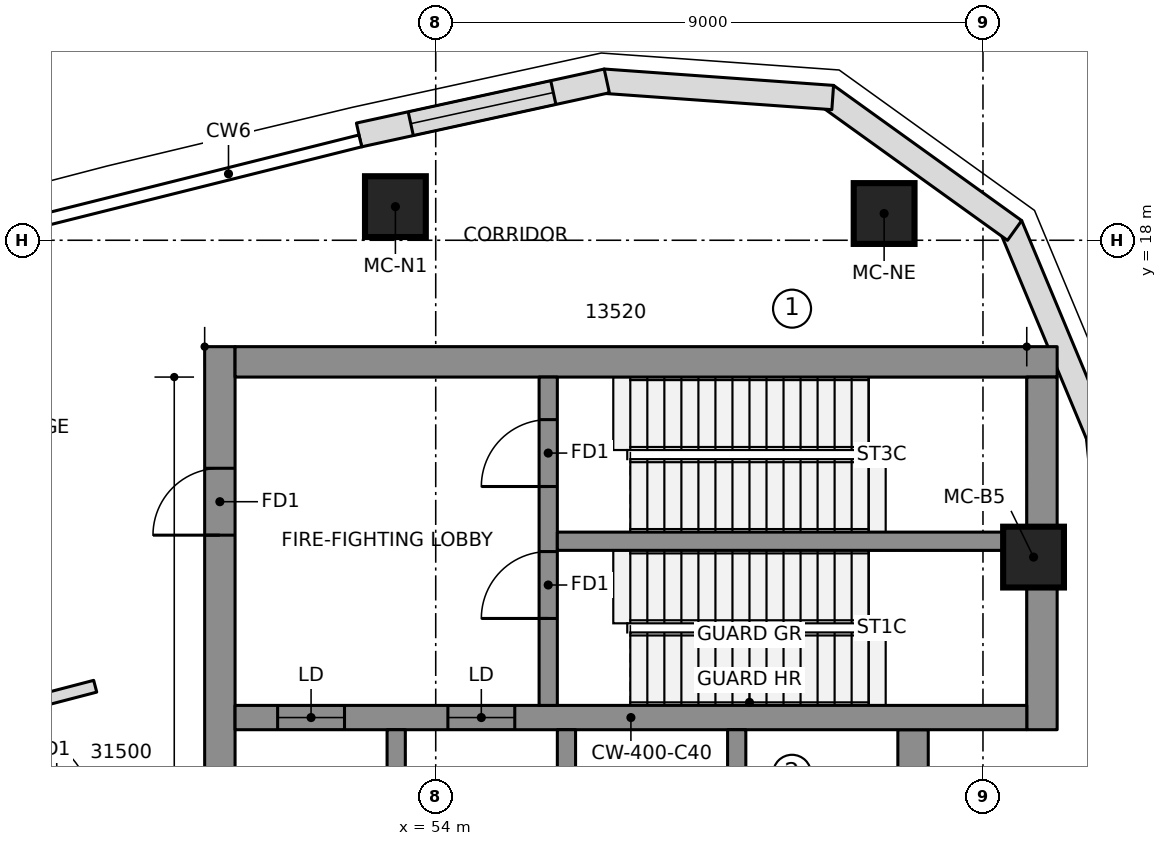
"""IFC4 building model, lengths in metres.
Left out: names, types, materials, properties, quantities, classifications, styles, units other than length and angle.
Written with IfcOpenShell. Run it as: python <this file> out.ifc"""

import sys

from ifc_helpers import new_model, si_unit, direction, frame, frame_2d, origin, origin_2d, place, context, subcontext, project, spatial, polyline, rectangle, outline, extrude, element, fill, save


model = new_model("IFC4")
c1 = context("Model", 3, precision=1e-05, world=origin(), true_north=direction((0.0, 1.0)))
c2 = subcontext(c1, "Body", "Model", "MODEL_VIEW")
j1 = project(units=[si_unit("LENGTHUNIT", "METRE"), si_unit("PLANEANGLEUNIT", "RADIAN")], contexts=[c1])
p1 = place(None, origin())
s1 = spatial("IfcSite", under=j1, at=p1, CompositionType="ELEMENT")
p2 = place(p1, origin())
s2 = spatial("IfcBuilding", under=s1, at=p2, CompositionType="ELEMENT")
p3 = place(p2, frame((0.0, 0.0, 313.2)))
s3 = spatial("IfcBuildingStorey", under=s2, at=p3, CompositionType="ELEMENT", Elevation=313.2)
p4 = place(p3, frame((50.45, 6.65, 0.0), z_axis=(0.0, 0.0, 1.0), x_axis=(0.0, 1.0, 0.0)))
e1 = element("IfcWall", 1, at=p4, inside=s3, PredefinedType="SHEAR", context=c2, shape_type="SweptSolid", body=[
    extrude(rectangle(XDim=9.6, YDim=0.5, at=frame_2d((4.8, 0.0))), origin(), (0.0, 0.0, 1.0), 5.4),
])
p5 = place(p4, frame((6.5, 0.0, 0.0)))
e2 = element("IfcOpeningElement", 2, at=p5, cuts=e1, PredefinedType="OPENING", context=c2, shape_type="SweptSolid", body=[
    extrude(rectangle(XDim=1.1, YDim=2.1, at=frame_2d((0.55, 1.05))), frame((0.0, 0.26, 0.0), z_axis=(0.0, -1.0, 0.0), x_axis=(1.0, 0.0, 0.0)), (0.0, 0.0, 1.0), 0.52),
])
p6 = place(p3, frame((50.7, 16.0, 0.0), z_axis=(0.0, 0.0, 1.0), x_axis=(1.0, 0.0, 0.0)))
e3 = element("IfcWall", 3, at=p6, inside=s3, PredefinedType="SHEAR", context=c2, shape_type="SweptSolid", body=[
    extrude(rectangle(XDim=13.52, YDim=0.5, at=frame_2d((6.76, 0.0))), origin(), (0.0, 0.0, 1.0), 5.4),
])
p7 = place(p3, frame((63.97, 9.95, 0.0), z_axis=(0.0, 0.0, 1.0), x_axis=(0.0, 1.0, 0.0)))
e4 = element("IfcWall", 4, at=p7, inside=s3, PredefinedType="SHEAR", context=c2, shape_type="SweptSolid", body=[
    extrude(rectangle(XDim=5.8, YDim=0.5, at=frame_2d((2.9, 0.0))), origin(), (0.0, 0.0, 1.0), 5.4),
])
p8 = place(p3, frame((61.85, -9.95, 0.0), z_axis=(0.0, 0.0, 1.0), x_axis=(0.0, 1.0, 0.0)))
e5 = element("IfcWall", 5, at=p8, inside=s3, PredefinedType="SHEAR", context=c2, shape_type="SweptSolid", body=[
    extrude(rectangle(XDim=19.9, YDim=0.5, at=frame_2d((9.95, 0.0))), origin(), (0.0, 0.0, 1.0), 5.4),
])
p9 = place(p3, frame((50.7, 10.15, 0.0), z_axis=(0.0, 0.0, 1.0), x_axis=(1.0, 0.0, 0.0)))
e6 = element("IfcWall", 6, at=p9, inside=s3, PredefinedType="SHEAR", context=c2, shape_type="SweptSolid", body=[
    extrude(rectangle(XDim=13.02, YDim=0.4, at=frame_2d((6.51, 0.0))), origin(), (0.0, 0.0, 1.0), 5.4),
])
p10 = place(p9, frame((0.7, 0.0, 0.0)))
e7 = element("IfcOpeningElement", 7, at=p10, cuts=e6, PredefinedType="OPENING", context=c2, shape_type="SweptSolid", body=[
    extrude(rectangle(XDim=1.1, YDim=2.1, at=frame_2d((0.55, 1.05))), frame((0.0, 0.21, 0.0), z_axis=(0.0, -1.0, 0.0), x_axis=(1.0, 0.0, 0.0)), (0.0, 0.0, 1.0), 0.42),
])
p11 = place(p9, frame((3.5, 0.0, 0.0)))
e8 = element("IfcOpeningElement", 8, at=p11, cuts=e6, PredefinedType="OPENING", context=c2, shape_type="SweptSolid", body=[
    extrude(rectangle(XDim=1.1, YDim=2.1, at=frame_2d((0.55, 1.05))), frame((0.0, 0.21, 0.0), z_axis=(0.0, -1.0, 0.0), x_axis=(1.0, 0.0, 0.0)), (0.0, 0.0, 1.0), 0.42),
])
for number, where, z_axis, x_axis in (
    (9, (53.35, 6.95, 0.0), (0.0, 0.0, 1.0), (0.0, 1.0, 0.0)),
    (10, (56.15, 6.95, 0.0), (0.0, 0.0, 1.0), (0.0, 1.0, 0.0)),
    (11, (58.95, 6.95, 0.0), (0.0, 0.0, 1.0), (0.0, 1.0, 0.0)),
):
    element("IfcWall", number, at=place(p3, frame(where, z_axis=z_axis, x_axis=x_axis)), inside=s3, PredefinedType="SHEAR", context=c2, shape_type="SweptSolid", body=[
        extrude(rectangle(XDim=3.0, YDim=0.3, at=frame_2d((1.5, 0.0))), origin(), (0.0, 0.0, 1.0), 5.4),
    ])
p12 = place(p3, frame((55.85, 10.35, 0.0), z_axis=(0.0, 0.0, 1.0), x_axis=(0.0, 1.0, 0.0)))
e12 = element("IfcWall", 12, at=p12, inside=s3, PredefinedType="SHEAR", context=c2, shape_type="SweptSolid", body=[
    extrude(rectangle(XDim=5.4, YDim=0.3, at=frame_2d((2.7, 0.0))), origin(), (0.0, 0.0, 1.0), 5.4),
])
p13 = place(p12, frame((1.43, 0.0, 0.0)))
e13 = element("IfcOpeningElement", 13, at=p13, cuts=e12, PredefinedType="OPENING", context=c2, shape_type="SweptSolid", body=[
    extrude(rectangle(XDim=1.1, YDim=2.1, at=frame_2d((0.55, 1.05))), frame((0.0, 0.16, 0.0), z_axis=(0.0, -1.0, 0.0), x_axis=(1.0, 0.0, 0.0)), (0.0, 0.0, 1.0), 0.32),
])
p14 = place(p12, frame((3.6, 0.0, 0.0)))
e14 = element("IfcOpeningElement", 14, at=p14, cuts=e12, PredefinedType="OPENING", context=c2, shape_type="SweptSolid", body=[
    extrude(rectangle(XDim=1.1, YDim=2.1, at=frame_2d((0.55, 1.05))), frame((0.0, 0.16, 0.0), z_axis=(0.0, -1.0, 0.0), x_axis=(1.0, 0.0, 0.0)), (0.0, 0.0, 1.0), 0.32),
])
p15 = place(p3, frame((56.0, 13.05, 0.0), z_axis=(0.0, 0.0, 1.0), x_axis=(1.0, 0.0, 0.0)))
e15 = element("IfcWall", 15, at=p15, inside=s3, PredefinedType="SHEAR", context=c2, shape_type="SweptSolid", body=[
    extrude(rectangle(XDim=7.72, YDim=0.3, at=frame_2d((3.86, 0.0))), origin(), (0.0, 0.0, 1.0), 5.4),
])
for number, where, z_axis, x_axis in (
    (16, (63.832, 12.789, 0.0), (0.0, 0.0, 1.0), (1.0, 0.0, 0.0)),
    (17, (61.374, 18.44, 0.0), (0.0, 0.0, 1.0), (1.0, 0.0, 0.0)),
    (18, (53.337, 18.553, 0.0), (0.0, 0.0, 1.0), (1.0, 0.0, 0.0)),
):
    element("IfcColumn", number, at=place(p3, frame(where, z_axis=z_axis, x_axis=x_axis)), inside=s3, PredefinedType="COLUMN", context=c2, shape_type="SweptSolid", body=[
        extrude(rectangle(XDim=1.0, YDim=1.0, at=origin_2d()), origin(), (0.0, 0.0, 1.0), 5.4),
    ])
p16 = place(p3, frame((65.331, 10.571, 0.0), z_axis=(0.0, 0.0, 1.0), x_axis=(-0.102249826987, 0.994758751096, 0.0)))
e19 = element("IfcWall", 19, at=p16, inside=s3, PredefinedType="NOTDEFINED", context=c2, shape_type="SweptSolid", body=[
    extrude(outline(polyline([(-0.003, -0.2), (4.263, -0.2), (4.204, 0.2), (0.003, 0.2), (-0.003, -0.2)])), origin(), (0.0, 0.0, 1.0), 5.1),
])
p17 = place(p16, frame((0.417, 0.0, 0.3)))
e20 = element("IfcOpeningElement", 20, at=p17, cuts=e19, PredefinedType="OPENING", context=c2, shape_type="SweptSolid", body=[
    extrude(rectangle(XDim=2.4, YDim=3.0, at=frame_2d((1.2, 1.5))), frame((0.0, 0.21, 0.0), z_axis=(0.0, -1.0, 0.0), x_axis=(1.0, 0.0, 0.0)), (0.0, 0.0, 1.0), 0.42),
])
p18 = place(p3, frame((64.898, 14.782, 0.0), z_axis=(0.0, 0.0, 1.0), x_axis=(-0.385285857918, 0.922797273343, 0.0)))
e21 = element("IfcWall", 21, at=p18, inside=s3, PredefinedType="NOTDEFINED", context=c2, shape_type="SweptSolid", body=[
    extrude(outline(polyline([(-0.03, -0.2), (3.753, -0.2), (3.64, 0.2), (0.03, 0.2), (-0.03, -0.2)])), origin(), (0.0, 0.0, 1.0), 5.1),
])
p19 = place(p3, frame((63.474, 18.194, 0.0), z_axis=(0.0, 0.0, 1.0), x_axis=(-0.811962548682, 0.583709533533, 0.0)))
e22 = element("IfcWall", 22, at=p19, inside=s3, PredefinedType="NOTDEFINED", context=c2, shape_type="SweptSolid", body=[
    extrude(outline(polyline([(-0.057, -0.2), (3.753, -0.2), (3.64, 0.2), (0.057, 0.2), (-0.057, -0.2)])), origin(), (0.0, 0.0, 1.0), 5.1),
])
p20 = place(p3, frame((60.472, 20.352, 0.0), z_axis=(0.0, 0.0, 1.0), x_axis=(-0.99746272096, 0.071190731806, 0.0)))
e23 = element("IfcWall", 23, at=p20, inside=s3, PredefinedType="NOTDEFINED", context=c2, shape_type="SweptSolid", body=[
    extrude(outline(polyline([(-0.057, -0.2), (3.726, -0.2), (3.668, 0.2), (0.057, 0.2), (-0.057, -0.2)])), origin(), (0.0, 0.0, 1.0), 5.1),
])
p21 = place(p3, frame((56.785, 20.615, 0.0), z_axis=(0.0, 0.0, 1.0), x_axis=(-0.977020225348, -0.213146614471, 0.0)))
e24 = element("IfcWall", 24, at=p21, inside=s3, PredefinedType="NOTDEFINED", context=c2, shape_type="SweptSolid", body=[
    extrude(outline(polyline([(-0.029, -0.2), (4.142, -0.2), (4.142, 0.2), (0.029, 0.2), (-0.029, -0.2)])), origin(), (0.0, 0.0, 1.0), 5.1),
])
p22 = place(p21, frame((0.871, 0.0, 0.3)))
e25 = element("IfcOpeningElement", 25, at=p22, cuts=e24, PredefinedType="OPENING", context=c2, shape_type="SweptSolid", body=[
    extrude(rectangle(XDim=2.4, YDim=3.0, at=frame_2d((1.2, 1.5))), frame((0.0, 0.21, 0.0), z_axis=(0.0, -1.0, 0.0), x_axis=(1.0, 0.0, 0.0)), (0.0, 0.0, 1.0), 0.42),
])
p23 = place(p3, frame((48.4, 10.665, 0.0), z_axis=(0.0, 0.0, 1.0), x_axis=(-0.967689993731, -0.252142967448, 0.0)))
e26 = element("IfcWall", 26, at=p23, inside=s3, PredefinedType="PARTITIONING", context=c2, shape_type="SweptSolid", body=[
    extrude(rectangle(XDim=1.069, YDim=0.2, at=frame_2d((0.534, 0.0))), origin(), (0.0, 0.0, 1.0), 5.1),
])
p24 = place(p22, origin())
e27 = element("IfcWindow", 27, at=p24, inside=s3, PartitioningType="SINGLE_PANEL", PredefinedType="WINDOW", context=c2, shape_type="SweptSolid", body=[
    extrude(rectangle(XDim=2.4, YDim=3.0, at=frame_2d((1.2, 1.5))), frame((0.0, 0.17, 0.0), z_axis=(0.0, -1.0, 0.0), x_axis=(1.0, 0.0, 0.0)), (0.0, 0.0, 1.0), 0.06),
])
fill(e25, e27)
p25 = place(p10, origin())
e28 = element("IfcDoor", 28, at=p25, inside=s3, OperationType="DOUBLE_DOOR_SLIDING", PredefinedType="DOOR", context=c2, shape_type="SweptSolid", body=[
    extrude(rectangle(XDim=1.1, YDim=2.1, at=frame_2d((0.55, 1.05))), frame((0.0, 0.025, 0.0), z_axis=(0.0, -1.0, 0.0), x_axis=(1.0, 0.0, 0.0)), (0.0, 0.0, 1.0), 0.05),
])
fill(e7, e28)
p26 = place(p11, origin())
e29 = element("IfcDoor", 29, at=p26, inside=s3, OperationType="DOUBLE_DOOR_SLIDING", PredefinedType="DOOR", context=c2, shape_type="SweptSolid", body=[
    extrude(rectangle(XDim=1.1, YDim=2.1, at=frame_2d((0.55, 1.05))), frame((0.0, 0.025, 0.0), z_axis=(0.0, -1.0, 0.0), x_axis=(1.0, 0.0, 0.0)), (0.0, 0.0, 1.0), 0.05),
])
fill(e8, e29)
p27 = place(p13, origin())
e30 = element("IfcDoor", 30, at=p27, inside=s3, OperationType="SINGLE_SWING_RIGHT", PredefinedType="DOOR", context=c2, shape_type="SweptSolid", body=[
    extrude(rectangle(XDim=1.1, YDim=2.1, at=frame_2d((0.55, 1.05))), frame((0.0, 0.025, 0.0), z_axis=(0.0, -1.0, 0.0), x_axis=(1.0, 0.0, 0.0)), (0.0, 0.0, 1.0), 0.05),
])
fill(e13, e30)
p28 = place(p14, origin())
e31 = element("IfcDoor", 31, at=p28, inside=s3, OperationType="SINGLE_SWING_RIGHT", PredefinedType="DOOR", context=c2, shape_type="SweptSolid", body=[
    extrude(rectangle(XDim=1.1, YDim=2.1, at=frame_2d((0.55, 1.05))), frame((0.0, 0.025, 0.0), z_axis=(0.0, -1.0, 0.0), x_axis=(1.0, 0.0, 0.0)), (0.0, 0.0, 1.0), 0.05),
])
fill(e14, e31)
p29 = place(p5, origin())
e32 = element("IfcDoor", 32, at=p29, inside=s3, OperationType="SINGLE_SWING_RIGHT", PredefinedType="DOOR", context=c2, shape_type="SweptSolid", body=[
    extrude(rectangle(XDim=1.1, YDim=2.1, at=frame_2d((0.55, 1.05))), frame((0.0, 0.025, 0.0), z_axis=(0.0, -1.0, 0.0), x_axis=(1.0, 0.0, 0.0)), (0.0, 0.0, 1.0), 0.05),
])
fill(e2, e32)
save(model, sys.argv[1])
